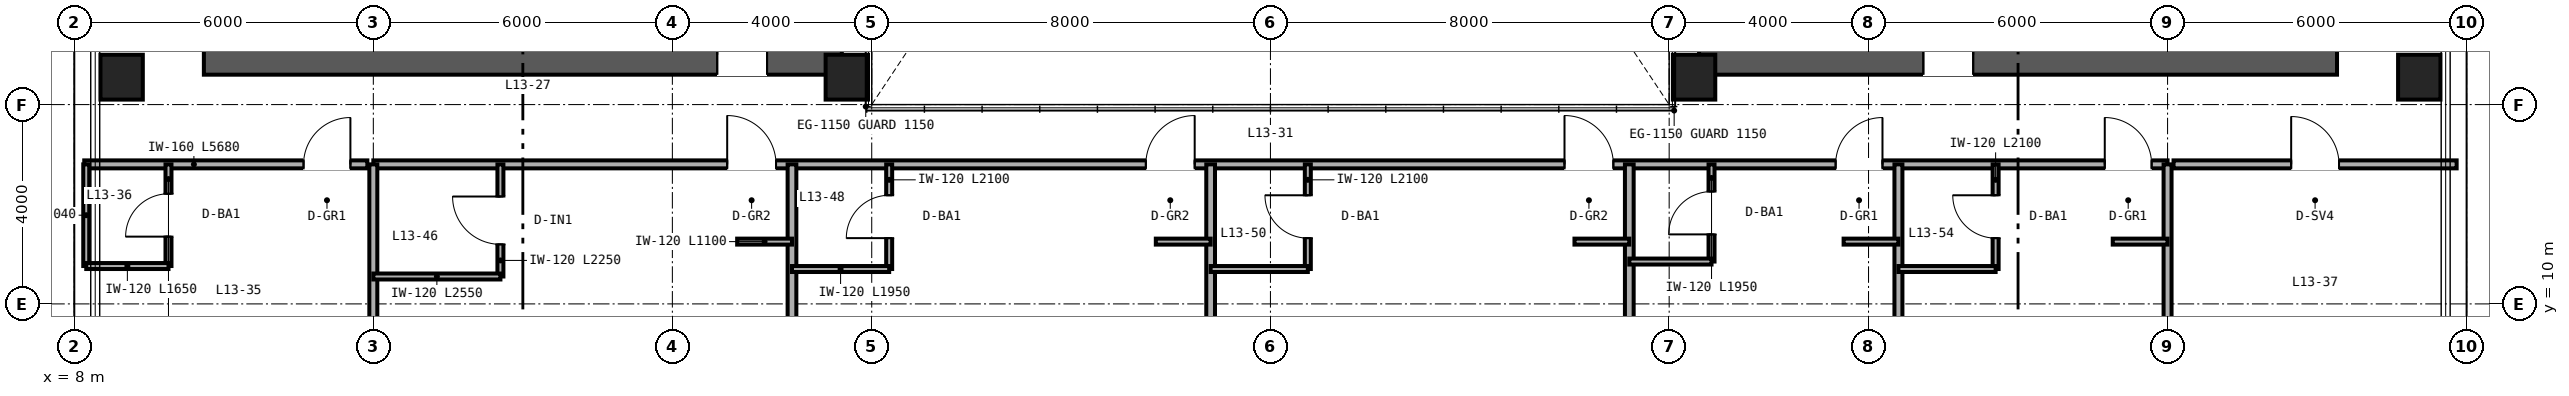
"""IFC4 building model, lengths in metres.
Left out: names, types, materials, properties, quantities, classifications, styles, units other than length and angle.
Written with IfcOpenShell. Run it as: python <this file> out.ifc"""

import sys

from ifc_helpers import new_model, si_unit, direction, frame, frame_2d, origin, origin_2d, place, context, subcontext, project, spatial, rectangle, hollow_rectangle, extrude, source, transform, mapped, element, fill, save


model = new_model("IFC4")
c1 = context("Model", 3, precision=1e-05, world=origin(), true_north=direction((0.0, 1.0)))
c2 = subcontext(c1, "Body", "Model", "MODEL_VIEW")
j1 = project(units=[si_unit("LENGTHUNIT", "METRE"), si_unit("PLANEANGLEUNIT", "RADIAN")], contexts=[c1])
p1 = place(None, origin())
s1 = spatial("IfcSite", under=j1, at=p1, CompositionType="ELEMENT")
p2 = place(p1, origin())
s2 = spatial("IfcBuilding", under=s1, at=p2, CompositionType="ELEMENT")
p3 = place(p2, frame((0.0, 0.0, 56.4)))
s3 = spatial("IfcBuildingStorey", under=s2, at=p3, CompositionType="ELEMENT", Elevation=56.4)
p4 = place(p3, frame((10.6, 15.0, 0.0), z_axis=(0.0, 0.0, 1.0), x_axis=(1.0, 0.0, 0.0)))
e1 = element("IfcWall", 1, at=p4, inside=s3, PredefinedType="SHEAR", context=c2, shape_type="SweptSolid", body=[
    extrude(rectangle(XDim=12.8, YDim=0.8, at=frame_2d((6.4, 0.0))), origin(), (0.0, 0.0, 1.0), 3.35),
])
p5 = place(p4, frame((10.3, 0.0, 0.0)))
e2 = element("IfcOpeningElement", 2, at=p5, cuts=e1, PredefinedType="OPENING", context=c2, shape_type="SweptSolid", body=[
    extrude(rectangle(XDim=1.0, YDim=2.15, at=frame_2d((0.5, 1.075))), frame((0.0, 0.41, 0.0), z_axis=(0.0, -1.0, 0.0), x_axis=(1.0, 0.0, 0.0)), (0.0, 0.0, 1.0), 0.82),
])
p6 = place(p3, frame((40.6, 15.0, 0.0), z_axis=(0.0, 0.0, 1.0), x_axis=(1.0, 0.0, 0.0)))
e3 = element("IfcWall", 3, at=p6, inside=s3, PredefinedType="SHEAR", context=c2, shape_type="SweptSolid", body=[
    extrude(rectangle(XDim=12.8, YDim=0.8, at=frame_2d((6.4, 0.0))), origin(), (0.0, 0.0, 1.0), 3.35),
])
p7 = place(p6, frame((4.5, 0.0, 0.0)))
e4 = element("IfcOpeningElement", 4, at=p7, cuts=e3, PredefinedType="OPENING", context=c2, shape_type="SweptSolid", body=[
    extrude(rectangle(XDim=1.0, YDim=2.15, at=frame_2d((0.5, 1.075))), frame((0.0, 0.41, 0.0), z_axis=(0.0, -1.0, 0.0), x_axis=(1.0, 0.0, 0.0)), (0.0, 0.0, 1.0), 0.82),
])
m1 = source(origin(), c2, "Body", "SweptSolid", [
    extrude(hollow_rectangle(XDim=0.85, YDim=0.9, WallThickness=0.04, at=origin_2d()), origin(), (0.0, 0.0, 1.0), 3.35),
])
for number, where, z_axis, x_axis in (
    (5, (8.95, 14.55, 0.0), (0.0, 0.0, 1.0), (1.0, 0.0, 0.0)),
    (6, (23.5, 14.55, 0.0), (0.0, 0.0, 1.0), (1.0, 0.0, 0.0)),
    (7, (40.5, 14.55, 0.0), (0.0, 0.0, 1.0), (1.0, 0.0, 0.0)),
    (8, (55.05, 14.55, 0.0), (0.0, 0.0, 1.0), (1.0, 0.0, 0.0)),
):
    element("IfcColumn", number, at=place(p3, frame(where, z_axis=z_axis, x_axis=x_axis)), inside=s3, PredefinedType="COLUMN", context=c2, shape_type="MappedRepresentation", body=[
        mapped(m1, transform((0.0, 0.0, 0.0), scale=1.0)),
    ])
p8 = place(p3, frame((8.2, 12.8, 0.0), z_axis=(0.0, 0.0, 1.0), x_axis=(1.0, 0.0, 0.0)))
e9 = element("IfcWall", 9, at=p8, inside=s3, PredefinedType="PARTITIONING", context=c2, shape_type="SweptSolid", body=[
    extrude(rectangle(XDim=5.68, YDim=0.16, at=frame_2d((2.84, 0.0))), origin(), (0.0, 0.0, 1.0), 3.35),
])
p9 = place(p8, frame((4.4, 0.0, 0.0)))
e10 = element("IfcOpeningElement", 10, at=p9, cuts=e9, PredefinedType="OPENING", context=c2, shape_type="SweptSolid", body=[
    extrude(rectangle(XDim=0.94, YDim=2.15, at=frame_2d((0.47, 1.075))), frame((0.0, 0.09, 0.0), z_axis=(0.0, -1.0, 0.0), x_axis=(1.0, 0.0, 0.0)), (0.0, 0.0, 1.0), 0.18),
])
p10 = place(p3, frame((9.89, 10.76, 0.0), z_axis=(0.0, 0.0, 1.0), x_axis=(0.0, 1.0, 0.0)))
e11 = element("IfcWall", 11, at=p10, inside=s3, PredefinedType="PARTITIONING", context=c2, shape_type="SweptSolid", body=[
    extrude(rectangle(XDim=2.04, YDim=0.12, at=frame_2d((1.02, 0.0))), origin(), (0.0, 0.0, 1.0), 3.35),
])
p11 = place(p10, frame((0.59, 0.0, 0.0)))
e12 = element("IfcOpeningElement", 12, at=p11, cuts=e11, PredefinedType="OPENING", context=c2, shape_type="SweptSolid", body=[
    extrude(rectangle(XDim=0.86, YDim=2.1, at=frame_2d((0.43, 1.05))), frame((0.0, 0.07, 0.0), z_axis=(0.0, -1.0, 0.0), x_axis=(1.0, 0.0, 0.0)), (0.0, 0.0, 1.0), 0.14),
])
p12 = place(p3, frame((8.24, 10.76, 0.0), z_axis=(0.0, 0.0, 1.0), x_axis=(0.0, 1.0, 0.0)))
e13 = element("IfcWall", 13, at=p12, inside=s3, PredefinedType="PARTITIONING", context=c2, shape_type="SweptSolid", body=[
    extrude(rectangle(XDim=2.04, YDim=0.12, at=frame_2d((1.02, 0.0))), origin(), (0.0, 0.0, 1.0), 3.35),
])
p13 = place(p3, frame((8.24, 10.76, 0.0), z_axis=(0.0, 0.0, 1.0), x_axis=(1.0, 0.0, 0.0)))
e14 = element("IfcWall", 14, at=p13, inside=s3, PredefinedType="PARTITIONING", context=c2, shape_type="SweptSolid", body=[
    extrude(rectangle(XDim=1.65, YDim=0.12, at=frame_2d((0.825, 0.0))), origin(), (0.0, 0.0, 1.0), 3.35),
])
p14 = place(p3, frame((50.12, 12.8, 0.0), z_axis=(0.0, 0.0, 1.0), x_axis=(1.0, 0.0, 0.0)))
e15 = element("IfcWall", 15, at=p14, inside=s3, PredefinedType="PARTITIONING", context=c2, shape_type="SweptSolid", body=[
    extrude(rectangle(XDim=5.68, YDim=0.16, at=frame_2d((2.84, 0.0))), origin(), (0.0, 0.0, 1.0), 3.35),
])
p15 = place(p14, frame((2.36, 0.0, 0.0)))
e16 = element("IfcOpeningElement", 16, at=p15, cuts=e15, PredefinedType="OPENING", context=c2, shape_type="SweptSolid", body=[
    extrude(rectangle(XDim=0.96, YDim=2.15, at=frame_2d((0.48, 1.075))), frame((0.0, 0.09, 0.0), z_axis=(0.0, -1.0, 0.0), x_axis=(1.0, 0.0, 0.0)), (0.0, 0.0, 1.0), 0.18),
])
p16 = place(p3, frame((14.0, 12.8, 0.0), z_axis=(0.0, 0.0, 1.0), x_axis=(1.0, 0.0, 0.0)))
e17 = element("IfcWall", 17, at=p16, inside=s3, PredefinedType="PARTITIONING", context=c2, shape_type="SweptSolid", body=[
    extrude(rectangle(XDim=36.0, YDim=0.16, at=frame_2d((18.0, 0.0))), origin(), (0.0, 0.0, 1.0), 2.571),
])
p17 = place(p16, frame((7.1, 0.0, 0.0)))
e18 = element("IfcOpeningElement", 18, at=p17, cuts=e17, PredefinedType="OPENING", context=c2, shape_type="SweptSolid", body=[
    extrude(rectangle(XDim=0.98, YDim=2.2, at=frame_2d((0.49, 1.1))), frame((0.0, 0.09, 0.0), z_axis=(0.0, -1.0, 0.0), x_axis=(1.0, 0.0, 0.0)), (0.0, 0.0, 1.0), 0.18),
])
p18 = place(p16, frame((15.5, 0.0, 0.0)))
e19 = element("IfcOpeningElement", 19, at=p18, cuts=e17, PredefinedType="OPENING", context=c2, shape_type="SweptSolid", body=[
    extrude(rectangle(XDim=0.98, YDim=2.2, at=frame_2d((0.49, 1.1))), frame((0.0, 0.09, 0.0), z_axis=(0.0, -1.0, 0.0), x_axis=(1.0, 0.0, 0.0)), (0.0, 0.0, 1.0), 0.18),
])
p19 = place(p16, frame((23.9, 0.0, 0.0)))
e20 = element("IfcOpeningElement", 20, at=p19, cuts=e17, PredefinedType="OPENING", context=c2, shape_type="SweptSolid", body=[
    extrude(rectangle(XDim=0.98, YDim=2.2, at=frame_2d((0.49, 1.1))), frame((0.0, 0.09, 0.0), z_axis=(0.0, -1.0, 0.0), x_axis=(1.0, 0.0, 0.0)), (0.0, 0.0, 1.0), 0.18),
])
p20 = place(p16, frame((29.34, 0.0, 0.0)))
e21 = element("IfcOpeningElement", 21, at=p20, cuts=e17, PredefinedType="OPENING", context=c2, shape_type="SweptSolid", body=[
    extrude(rectangle(XDim=0.94, YDim=2.15, at=frame_2d((0.47, 1.075))), frame((0.0, 0.09, 0.0), z_axis=(0.0, -1.0, 0.0), x_axis=(1.0, 0.0, 0.0)), (0.0, 0.0, 1.0), 0.18),
])
p21 = place(p16, frame((34.74, 0.0, 0.0)))
e22 = element("IfcOpeningElement", 22, at=p21, cuts=e17, PredefinedType="OPENING", context=c2, shape_type="SweptSolid", body=[
    extrude(rectangle(XDim=0.94, YDim=2.15, at=frame_2d((0.47, 1.075))), frame((0.0, 0.09, 0.0), z_axis=(0.0, -1.0, 0.0), x_axis=(1.0, 0.0, 0.0)), (0.0, 0.0, 1.0), 0.18),
])
for number, where, z_axis, x_axis in (
    (23, (14.0, 2.36, 0.0), (0.0, 0.0, 1.0), (0.0, 1.0, 0.0)),
    (24, (50.0, 2.36, 0.0), (0.0, 0.0, 1.0), (0.0, 1.0, 0.0)),
):
    element("IfcWall", number, at=place(p3, frame(where, z_axis=z_axis, x_axis=x_axis)), inside=s3, PredefinedType="PARTITIONING", context=c2, shape_type="SweptSolid", body=[
        extrude(rectangle(XDim=10.44, YDim=0.16, at=frame_2d((5.22, 0.0))), origin(), (0.0, 0.0, 1.0), 2.657),
    ])
p22 = place(p3, frame((22.4, 2.36, 0.0), z_axis=(0.0, 0.0, 1.0), x_axis=(0.0, 1.0, 0.0)))
e25 = element("IfcWall", 25, at=p22, inside=s3, PredefinedType="PARTITIONING", context=c2, shape_type="SweptSolid", body=[
    extrude(rectangle(XDim=10.44, YDim=0.175, at=frame_2d((5.22, 0.0))), origin(), (0.0, 0.0, 1.0), 2.813),
])
p23 = place(p3, frame((16.55, 10.55, 0.0), z_axis=(0.0, 0.0, 1.0), x_axis=(0.0, 1.0, 0.0)))
e26 = element("IfcWall", 26, at=p23, inside=s3, PredefinedType="PARTITIONING", context=c2, shape_type="SweptSolid", body=[
    extrude(rectangle(XDim=2.25, YDim=0.12, at=frame_2d((1.125, 0.0))), origin(), (0.0, 0.0, 1.0), 3.35),
])
p24 = place(p23, frame((0.645, 0.0, 0.0)))
e27 = element("IfcOpeningElement", 27, at=p24, cuts=e26, PredefinedType="OPENING", context=c2, shape_type="SweptSolid", body=[
    extrude(rectangle(XDim=0.96, YDim=2.15, at=frame_2d((0.48, 1.075))), frame((0.0, 0.07, 0.0), z_axis=(0.0, -1.0, 0.0), x_axis=(1.0, 0.0, 0.0)), (0.0, 0.0, 1.0), 0.14),
])
p25 = place(p3, frame((14.0, 10.55, 0.0), z_axis=(0.0, 0.0, 1.0), x_axis=(1.0, 0.0, 0.0)))
e28 = element("IfcWall", 28, at=p25, inside=s3, PredefinedType="PARTITIONING", context=c2, shape_type="SweptSolid", body=[
    extrude(rectangle(XDim=2.55, YDim=0.12, at=frame_2d((1.275, 0.0))), origin(), (0.0, 0.0, 1.0), 3.35),
])
p26 = place(p3, frame((21.3, 11.25, 0.0), z_axis=(0.0, 0.0, 1.0), x_axis=(1.0, 0.0, 0.0)))
e29 = element("IfcWall", 29, at=p26, inside=s3, PredefinedType="PARTITIONING", context=c2, shape_type="SweptSolid", body=[
    extrude(rectangle(XDim=1.1, YDim=0.12, at=frame_2d((0.55, 0.0))), origin(), (0.0, 0.0, 1.0), 3.35),
])
p27 = place(p3, frame((30.8, 2.36, 0.0), z_axis=(0.0, 0.0, 1.0), x_axis=(0.0, 1.0, 0.0)))
e30 = element("IfcWall", 30, at=p27, inside=s3, PredefinedType="PARTITIONING", context=c2, shape_type="SweptSolid", body=[
    extrude(rectangle(XDim=10.44, YDim=0.175, at=frame_2d((5.22, 0.0))), origin(), (0.0, 0.0, 1.0), 2.423),
])
p28 = place(p3, frame((24.35, 10.7, 0.0), z_axis=(0.0, 0.0, 1.0), x_axis=(0.0, 1.0, 0.0)))
e31 = element("IfcWall", 31, at=p28, inside=s3, PredefinedType="PARTITIONING", context=c2, shape_type="SweptSolid", body=[
    extrude(rectangle(XDim=2.1, YDim=0.12, at=frame_2d((1.05, 0.0))), origin(), (0.0, 0.0, 1.0), 3.35),
])
p29 = place(p28, frame((0.62, 0.0, 0.0)))
e32 = element("IfcOpeningElement", 32, at=p29, cuts=e31, PredefinedType="OPENING", context=c2, shape_type="SweptSolid", body=[
    extrude(rectangle(XDim=0.86, YDim=2.1, at=frame_2d((0.43, 1.05))), frame((0.0, 0.07, 0.0), z_axis=(0.0, -1.0, 0.0), x_axis=(1.0, 0.0, 0.0)), (0.0, 0.0, 1.0), 0.14),
])
p30 = place(p3, frame((22.4, 10.7, 0.0), z_axis=(0.0, 0.0, 1.0), x_axis=(1.0, 0.0, 0.0)))
e33 = element("IfcWall", 33, at=p30, inside=s3, PredefinedType="PARTITIONING", context=c2, shape_type="SweptSolid", body=[
    extrude(rectangle(XDim=1.95, YDim=0.12, at=frame_2d((0.975, 0.0))), origin(), (0.0, 0.0, 1.0), 2.571),
])
p31 = place(p3, frame((29.7, 11.25, 0.0), z_axis=(0.0, 0.0, 1.0), x_axis=(1.0, 0.0, 0.0)))
e34 = element("IfcWall", 34, at=p31, inside=s3, PredefinedType="PARTITIONING", context=c2, shape_type="SweptSolid", body=[
    extrude(rectangle(XDim=1.1, YDim=0.12, at=frame_2d((0.55, 0.0))), origin(), (0.0, 0.0, 1.0), 3.35),
])
p32 = place(p3, frame((39.2, 2.36, 0.0), z_axis=(0.0, 0.0, 1.0), x_axis=(0.0, 1.0, 0.0)))
e35 = element("IfcWall", 35, at=p32, inside=s3, PredefinedType="PARTITIONING", context=c2, shape_type="SweptSolid", body=[
    extrude(rectangle(XDim=10.44, YDim=0.175, at=frame_2d((5.22, 0.0))), origin(), (0.0, 0.0, 1.0), 2.423),
])
p33 = place(p3, frame((32.75, 10.7, 0.0), z_axis=(0.0, 0.0, 1.0), x_axis=(0.0, 1.0, 0.0)))
e36 = element("IfcWall", 36, at=p33, inside=s3, PredefinedType="PARTITIONING", context=c2, shape_type="SweptSolid", body=[
    extrude(rectangle(XDim=2.1, YDim=0.12, at=frame_2d((1.05, 0.0))), origin(), (0.0, 0.0, 1.0), 3.35),
])
p34 = place(p33, frame((0.62, 0.0, 0.0)))
e37 = element("IfcOpeningElement", 37, at=p34, cuts=e36, PredefinedType="OPENING", context=c2, shape_type="SweptSolid", body=[
    extrude(rectangle(XDim=0.86, YDim=2.1, at=frame_2d((0.43, 1.05))), frame((0.0, 0.07, 0.0), z_axis=(0.0, -1.0, 0.0), x_axis=(1.0, 0.0, 0.0)), (0.0, 0.0, 1.0), 0.14),
])
p35 = place(p3, frame((30.8, 10.7, 0.0), z_axis=(0.0, 0.0, 1.0), x_axis=(1.0, 0.0, 0.0)))
e38 = element("IfcWall", 38, at=p35, inside=s3, PredefinedType="PARTITIONING", context=c2, shape_type="SweptSolid", body=[
    extrude(rectangle(XDim=1.95, YDim=0.12, at=frame_2d((0.975, 0.0))), origin(), (0.0, 0.0, 1.0), 3.35),
])
p36 = place(p3, frame((38.1, 11.25, 0.0), z_axis=(0.0, 0.0, 1.0), x_axis=(1.0, 0.0, 0.0)))
e39 = element("IfcWall", 39, at=p36, inside=s3, PredefinedType="PARTITIONING", context=c2, shape_type="SweptSolid", body=[
    extrude(rectangle(XDim=1.1, YDim=0.12, at=frame_2d((0.55, 0.0))), origin(), (0.0, 0.0, 1.0), 3.35),
])
p37 = place(p3, frame((44.6, 2.36, 0.0), z_axis=(0.0, 0.0, 1.0), x_axis=(0.0, 1.0, 0.0)))
e40 = element("IfcWall", 40, at=p37, inside=s3, PredefinedType="PARTITIONING", context=c2, shape_type="SweptSolid", body=[
    extrude(rectangle(XDim=10.44, YDim=0.16, at=frame_2d((5.22, 0.0))), origin(), (0.0, 0.0, 1.0), 2.657),
])
p38 = place(p3, frame((40.85, 10.85, 0.0), z_axis=(0.0, 0.0, 1.0), x_axis=(0.0, 1.0, 0.0)))
e41 = element("IfcWall", 41, at=p38, inside=s3, PredefinedType="PARTITIONING", context=c2, shape_type="SweptSolid", body=[
    extrude(rectangle(XDim=1.95, YDim=0.12, at=frame_2d((0.975, 0.0))), origin(), (0.0, 0.0, 1.0), 3.35),
])
p39 = place(p38, frame((0.545, 0.0, 0.0)))
e42 = element("IfcOpeningElement", 42, at=p39, cuts=e41, PredefinedType="OPENING", context=c2, shape_type="SweptSolid", body=[
    extrude(rectangle(XDim=0.86, YDim=2.1, at=frame_2d((0.43, 1.05))), frame((0.0, 0.07, 0.0), z_axis=(0.0, -1.0, 0.0), x_axis=(1.0, 0.0, 0.0)), (0.0, 0.0, 1.0), 0.14),
])
p40 = place(p3, frame((39.2, 10.85, 0.0), z_axis=(0.0, 0.0, 1.0), x_axis=(1.0, 0.0, 0.0)))
e43 = element("IfcWall", 43, at=p40, inside=s3, PredefinedType="PARTITIONING", context=c2, shape_type="SweptSolid", body=[
    extrude(rectangle(XDim=1.65, YDim=0.12, at=frame_2d((0.825, 0.0))), origin(), (0.0, 0.0, 1.0), 2.571),
])
p41 = place(p3, frame((43.5, 11.25, 0.0), z_axis=(0.0, 0.0, 1.0), x_axis=(1.0, 0.0, 0.0)))
e44 = element("IfcWall", 44, at=p41, inside=s3, PredefinedType="PARTITIONING", context=c2, shape_type="SweptSolid", body=[
    extrude(rectangle(XDim=1.1, YDim=0.12, at=frame_2d((0.55, 0.0))), origin(), (0.0, 0.0, 1.0), 3.35),
])
p42 = place(p3, frame((46.55, 10.7, 0.0), z_axis=(0.0, 0.0, 1.0), x_axis=(0.0, 1.0, 0.0)))
e45 = element("IfcWall", 45, at=p42, inside=s3, PredefinedType="PARTITIONING", context=c2, shape_type="SweptSolid", body=[
    extrude(rectangle(XDim=2.1, YDim=0.12, at=frame_2d((1.05, 0.0))), origin(), (0.0, 0.0, 1.0), 3.35),
])
p43 = place(p42, frame((0.62, 0.0, 0.0)))
e46 = element("IfcOpeningElement", 46, at=p43, cuts=e45, PredefinedType="OPENING", context=c2, shape_type="SweptSolid", body=[
    extrude(rectangle(XDim=0.86, YDim=2.1, at=frame_2d((0.43, 1.05))), frame((0.0, 0.07, 0.0), z_axis=(0.0, -1.0, 0.0), x_axis=(1.0, 0.0, 0.0)), (0.0, 0.0, 1.0), 0.14),
])
p44 = place(p3, frame((44.6, 10.7, 0.0), z_axis=(0.0, 0.0, 1.0), x_axis=(1.0, 0.0, 0.0)))
e47 = element("IfcWall", 47, at=p44, inside=s3, PredefinedType="PARTITIONING", context=c2, shape_type="SweptSolid", body=[
    extrude(rectangle(XDim=1.95, YDim=0.12, at=frame_2d((0.975, 0.0))), origin(), (0.0, 0.0, 1.0), 3.35),
])
p45 = place(p3, frame((48.9, 11.25, 0.0), z_axis=(0.0, 0.0, 1.0), x_axis=(1.0, 0.0, 0.0)))
e48 = element("IfcWall", 48, at=p45, inside=s3, PredefinedType="PARTITIONING", context=c2, shape_type="SweptSolid", body=[
    extrude(rectangle(XDim=1.1, YDim=0.12, at=frame_2d((0.55, 0.0))), origin(), (0.0, 0.0, 1.0), 3.35),
])
m2 = source(origin(), c2, "Body", "SweptSolid", [
    extrude(rectangle(XDim=1.0, YDim=2.15, at=frame_2d((0.5, 1.075))), frame((0.0, 0.025, 0.0), z_axis=(0.0, -1.0, 0.0), x_axis=(1.0, 0.0, 0.0)), (0.0, 0.0, 1.0), 0.05),
])
p46 = place(p5, origin())
e49 = element("IfcDoor", 49, at=p46, inside=s3, OperationType="SINGLE_SWING_LEFT", PredefinedType="DOOR", context=c2, shape_type="MappedRepresentation", body=[
    mapped(m2, transform((0.0, 0.0, 0.0), scale=1.0)),
])
fill(e2, e49)
p47 = place(p7, origin())
e50 = element("IfcDoor", 50, at=p47, inside=s3, OperationType="SINGLE_SWING_RIGHT", PredefinedType="DOOR", context=c2, shape_type="MappedRepresentation", body=[
    mapped(m2, transform((0.0, 0.0, 0.0), scale=1.0)),
])
fill(e4, e50)
m3 = source(origin(), c2, "Body", "SweptSolid", [
    extrude(rectangle(XDim=0.86, YDim=2.1, at=frame_2d((0.43, 1.05))), frame((0.0, 0.025, 0.0), z_axis=(0.0, -1.0, 0.0), x_axis=(1.0, 0.0, 0.0)), (0.0, 0.0, 1.0), 0.05),
])
p48 = place(p11, origin())
e51 = element("IfcDoor", 51, at=p48, inside=s3, OperationType="SINGLE_SWING_LEFT", PredefinedType="DOOR", context=c2, shape_type="MappedRepresentation", body=[
    mapped(m3, transform((0.0, 0.0, 0.0), scale=1.0)),
])
fill(e12, e51)
m4 = source(origin(), c2, "Body", "SweptSolid", [
    extrude(rectangle(XDim=0.94, YDim=2.15, at=frame_2d((0.47, 1.075))), frame((0.0, 0.025, 0.0), z_axis=(0.0, -1.0, 0.0), x_axis=(1.0, 0.0, 0.0)), (0.0, 0.0, 1.0), 0.05),
])
p49 = place(p9, origin())
e52 = element("IfcDoor", 52, at=p49, inside=s3, OperationType="SINGLE_SWING_RIGHT", PredefinedType="DOOR", context=c2, shape_type="MappedRepresentation", body=[
    mapped(m4, transform((0.0, 0.0, 0.0), scale=1.0)),
])
fill(e10, e52)
m5 = source(origin(), c2, "Body", "SweptSolid", [
    extrude(rectangle(XDim=0.96, YDim=2.15, at=frame_2d((0.48, 1.075))), frame((0.0, 0.025, 0.0), z_axis=(0.0, -1.0, 0.0), x_axis=(1.0, 0.0, 0.0)), (0.0, 0.0, 1.0), 0.05),
])
p50 = place(p15, origin())
e53 = element("IfcDoor", 53, at=p50, inside=s3, OperationType="SINGLE_SWING_LEFT", PredefinedType="DOOR", context=c2, shape_type="MappedRepresentation", body=[
    mapped(m5, transform((0.0, 0.0, 0.0), scale=1.0)),
])
fill(e16, e53)
p51 = place(p24, origin())
e54 = element("IfcDoor", 54, at=p51, inside=s3, OperationType="SINGLE_SWING_RIGHT", PredefinedType="DOOR", context=c2, shape_type="MappedRepresentation", body=[
    mapped(m5, transform((0.0, 0.0, 0.0), scale=1.0)),
])
fill(e27, e54)
p52 = place(p29, origin())
e55 = element("IfcDoor", 55, at=p52, inside=s3, OperationType="SINGLE_SWING_LEFT", PredefinedType="DOOR", context=c2, shape_type="MappedRepresentation", body=[
    mapped(m3, transform((0.0, 0.0, 0.0), scale=1.0)),
])
fill(e32, e55)
p53 = place(p34, origin())
e56 = element("IfcDoor", 56, at=p53, inside=s3, OperationType="SINGLE_SWING_RIGHT", PredefinedType="DOOR", context=c2, shape_type="MappedRepresentation", body=[
    mapped(m3, transform((0.0, 0.0, 0.0), scale=1.0)),
])
fill(e37, e56)
p54 = place(p39, origin())
e57 = element("IfcDoor", 57, at=p54, inside=s3, OperationType="SINGLE_SWING_LEFT", PredefinedType="DOOR", context=c2, shape_type="MappedRepresentation", body=[
    mapped(m3, transform((0.0, 0.0, 0.0), scale=1.0)),
])
fill(e42, e57)
p55 = place(p43, origin())
e58 = element("IfcDoor", 58, at=p55, inside=s3, OperationType="SINGLE_SWING_RIGHT", PredefinedType="DOOR", context=c2, shape_type="MappedRepresentation", body=[
    mapped(m3, transform((0.0, 0.0, 0.0), scale=1.0)),
])
fill(e46, e58)
m6 = source(origin(), c2, "Body", "SweptSolid", [
    extrude(rectangle(XDim=0.98, YDim=2.2, at=frame_2d((0.49, 1.1))), frame((0.0, 0.025, 0.0), z_axis=(0.0, -1.0, 0.0), x_axis=(1.0, 0.0, 0.0)), (0.0, 0.0, 1.0), 0.05),
])
p56 = place(p17, origin())
e59 = element("IfcDoor", 59, at=p56, inside=s3, OperationType="SINGLE_SWING_LEFT", PredefinedType="DOOR", context=c2, shape_type="MappedRepresentation", body=[
    mapped(m6, transform((0.0, 0.0, 0.0), scale=1.0)),
])
fill(e18, e59)
p57 = place(p18, origin())
e60 = element("IfcDoor", 60, at=p57, inside=s3, OperationType="SINGLE_SWING_RIGHT", PredefinedType="DOOR", context=c2, shape_type="MappedRepresentation", body=[
    mapped(m6, transform((0.0, 0.0, 0.0), scale=1.0)),
])
fill(e19, e60)
p58 = place(p19, origin())
e61 = element("IfcDoor", 61, at=p58, inside=s3, OperationType="SINGLE_SWING_LEFT", PredefinedType="DOOR", context=c2, shape_type="MappedRepresentation", body=[
    mapped(m6, transform((0.0, 0.0, 0.0), scale=1.0)),
])
fill(e20, e61)
p59 = place(p20, origin())
e62 = element("IfcDoor", 62, at=p59, inside=s3, OperationType="SINGLE_SWING_RIGHT", PredefinedType="DOOR", context=c2, shape_type="MappedRepresentation", body=[
    mapped(m4, transform((0.0, 0.0, 0.0), scale=1.0)),
])
fill(e21, e62)
p60 = place(p21, origin())
e63 = element("IfcDoor", 63, at=p60, inside=s3, OperationType="SINGLE_SWING_LEFT", PredefinedType="DOOR", context=c2, shape_type="MappedRepresentation", body=[
    mapped(m4, transform((0.0, 0.0, 0.0), scale=1.0)),
])
fill(e22, e63)
save(model, sys.argv[1])
